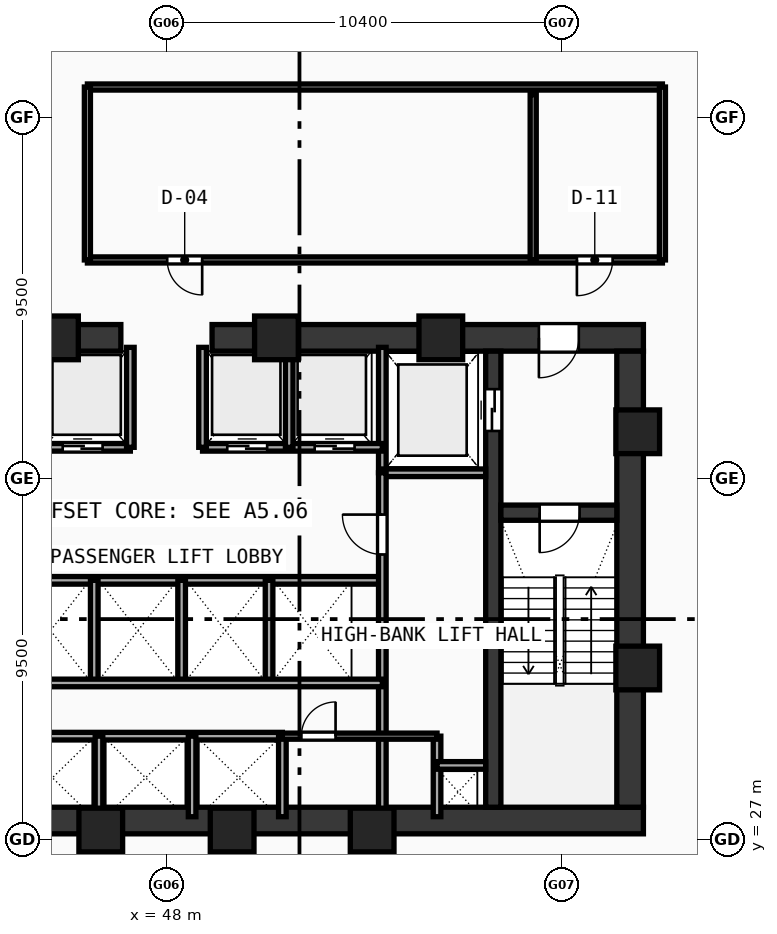
"""IFC4 building model, lengths in metres.
Left out: names, types, materials, properties, quantities, classifications, styles, units other than length and angle.
Written with IfcOpenShell. Run it as: python <this file> out.ifc"""

import sys

from ifc_helpers import new_model, si_unit, direction, frame, frame_2d, origin, origin_with_axes, origin_2d, place, context, subcontext, project, spatial, rectangle, hollow_rectangle, extrude, source, transform, mapped, element, fill, save


model = new_model("IFC4")
c1 = context("Model", 3, precision=1e-05, world=origin(), true_north=direction((0.0, 1.0)))
c2 = subcontext(c1, "Body", "Model", "MODEL_VIEW")
j1 = project(units=[si_unit("LENGTHUNIT", "METRE"), si_unit("PLANEANGLEUNIT", "RADIAN")], contexts=[c1])
p1 = place(None, origin())
s1 = spatial("IfcSite", under=j1, at=p1, CompositionType="ELEMENT")
p2 = place(p1, origin())
s2 = spatial("IfcBuilding", under=s1, at=p2, CompositionType="ELEMENT")
p3 = place(p2, frame((0.0, 0.0, 59.44)))
s3 = spatial("IfcBuildingStorey", under=s2, at=p3, CompositionType="ELEMENT", Elevation=59.44)
p4 = place(p3, frame((35.45, 27.5, 0.0), z_axis=(0.0, 0.0, 1.0), x_axis=(1.0, 0.0, 0.0)))
e1 = element("IfcWall", 1, at=p4, inside=s3, PredefinedType="SHEAR", context=c2, shape_type="SweptSolid", body=[
    extrude(rectangle(XDim=25.1, YDim=0.7, at=frame_2d((12.55, 0.0))), origin(), (0.0, 0.0, 1.0), 3.37),
])
p5 = place(p3, frame((35.45, 40.2, 0.0), z_axis=(0.0, 0.0, 1.0), x_axis=(1.0, 0.0, 0.0)))
e2 = element("IfcWall", 2, at=p5, inside=s3, PredefinedType="SHEAR", context=c2, shape_type="SweptSolid", body=[
    extrude(rectangle(XDim=11.35, YDim=0.7, at=frame_2d((5.675, 0.0))), origin(), (0.0, 0.0, 1.0), 3.37),
])
p6 = place(p5, frame((1.7, 0.0, 0.0)))
e3 = element("IfcOpeningElement", 3, at=p6, cuts=e2, PredefinedType="OPENING", context=c2, shape_type="SweptSolid", body=[
    extrude(rectangle(XDim=1.05, YDim=2.1, at=frame_2d((0.525, 1.05))), frame((0.0, 0.36, 0.0), z_axis=(0.0, -1.0, 0.0), x_axis=(1.0, 0.0, 0.0)), (0.0, 0.0, 1.0), 0.72),
])
p7 = place(p3, frame((49.2, 40.2, 0.0), z_axis=(0.0, 0.0, 1.0), x_axis=(1.0, 0.0, 0.0)))
e4 = element("IfcWall", 4, at=p7, inside=s3, PredefinedType="SHEAR", context=c2, shape_type="SweptSolid", body=[
    extrude(rectangle(XDim=11.35, YDim=0.7, at=frame_2d((5.675, 0.0))), origin(), (0.0, 0.0, 1.0), 3.37),
])
p8 = place(p7, frame((8.6, 0.0, 0.0)))
e5 = element("IfcOpeningElement", 5, at=p8, cuts=e4, PredefinedType="OPENING", context=c2, shape_type="SweptSolid", body=[
    extrude(rectangle(XDim=1.05, YDim=2.1, at=frame_2d((0.525, 1.05))), frame((0.0, 0.36, 0.0), z_axis=(0.0, -1.0, 0.0), x_axis=(1.0, 0.0, 0.0)), (0.0, 0.0, 1.0), 0.72),
])
p9 = place(p3, frame((60.2, 27.85, 0.0), z_axis=(0.0, 0.0, 1.0), x_axis=(0.0, 1.0, 0.0)))
e6 = element("IfcWall", 6, at=p9, inside=s3, PredefinedType="SHEAR", context=c2, shape_type="SweptSolid", body=[
    extrude(rectangle(XDim=12.0, YDim=0.7, at=frame_2d((6.0, 0.0))), origin(), (0.0, 0.0, 1.0), 3.37),
])
p10 = place(p3, frame((56.6, 27.85, 0.0), z_axis=(0.0, 0.0, 1.0), x_axis=(0.0, 1.0, 0.0)))
e7 = element("IfcWall", 7, at=p10, inside=s3, PredefinedType="SHEAR", context=c2, shape_type="SweptSolid", body=[
    extrude(rectangle(XDim=12.0, YDim=0.4, at=frame_2d((6.0, 0.0))), origin(), (0.0, 0.0, 1.0), 3.37),
])
p11 = place(p10, frame((9.9, 0.0, 0.0)))
e8 = element("IfcOpeningElement", 8, at=p11, cuts=e7, PredefinedType="OPENING", context=c2, shape_type="SweptSolid", body=[
    extrude(rectangle(XDim=1.1, YDim=2.1, at=frame_2d((0.55, 1.05))), frame((0.0, 0.21, 0.0), z_axis=(0.0, -1.0, 0.0), x_axis=(1.0, 0.0, 0.0)), (0.0, 0.0, 1.0), 0.42),
])
p12 = place(p3, frame((56.8, 35.6, 0.0), z_axis=(0.0, 0.0, 1.0), x_axis=(1.0, 0.0, 0.0)))
e9 = element("IfcWall", 9, at=p12, inside=s3, PredefinedType="SHEAR", context=c2, shape_type="SweptSolid", body=[
    extrude(rectangle(XDim=3.05, YDim=0.4, at=frame_2d((1.525, 0.0))), origin(), (0.0, 0.0, 1.0), 3.37),
])
p13 = place(p12, frame((1.02, 0.0, 0.0)))
e10 = element("IfcOpeningElement", 10, at=p13, cuts=e9, PredefinedType="OPENING", context=c2, shape_type="SweptSolid", body=[
    extrude(rectangle(XDim=1.05, YDim=2.1, at=frame_2d((0.525, 1.05))), frame((0.0, 0.21, 0.0), z_axis=(0.0, -1.0, 0.0), x_axis=(1.0, 0.0, 0.0)), (0.0, 0.0, 1.0), 0.42),
])
m1 = source(origin(), c2, "Body", "SweptSolid", [
    extrude(hollow_rectangle(XDim=1.15, YDim=1.15, WallThickness=0.048, at=origin_2d()), origin(), (0.0, 0.0, 1.0), 3.63),
])
for number, where, z_axis, x_axis in (
    (11, (46.272, 27.25, -0.26), (0.0, 0.0, 1.0), (1.0, 0.0, 0.0)),
    (12, (49.729, 27.25, -0.26), (0.0, 0.0, 1.0), (1.0, 0.0, 0.0)),
    (13, (53.412, 27.25, -0.26), (0.0, 0.0, 1.0), (1.0, 0.0, 0.0)),
    (14, (60.4, 31.513, -0.26), (0.0, 0.0, 1.0), (1.0, 0.0, 0.0)),
    (15, (60.4, 37.729, -0.26), (0.0, 0.0, 1.0), (1.0, 0.0, 0.0)),
    (16, (55.219, 40.2, -0.26), (0.0, 0.0, 1.0), (1.0, 0.0, 0.0)),
    (17, (50.894, 40.2, -0.26), (0.0, 0.0, 1.0), (1.0, 0.0, 0.0)),
    (18, (45.106, 40.2, -0.26), (0.0, 0.0, 1.0), (1.0, 0.0, 0.0)),
):
    element("IfcColumn", number, at=place(p3, frame(where, z_axis=z_axis, x_axis=x_axis)), inside=s3, PredefinedType="COLUMN", context=c2, shape_type="MappedRepresentation", body=[
        mapped(m1, transform((0.0, 0.0, 0.0), scale=1.0)),
    ])
p14 = place(p3, frame((53.68, 36.65, 0.0), z_axis=(0.0, 0.0, 1.0), x_axis=(0.0, 1.0, 0.0)))
e19 = element("IfcWall", 19, at=p14, inside=s3, PredefinedType="SOLIDWALL", context=c2, shape_type="SweptSolid", body=[
    extrude(rectangle(XDim=3.3, YDim=0.2, at=frame_2d((1.65, 0.0))), origin(), (0.0, 0.0, 1.0), 3.37),
])
p15 = place(p3, frame((53.68, 36.65, 0.0), z_axis=(0.0, 0.0, 1.0), x_axis=(1.0, 0.0, 0.0)))
e20 = element("IfcWall", 20, at=p15, inside=s3, PredefinedType="SOLIDWALL", context=c2, shape_type="SweptSolid", body=[
    extrude(rectangle(XDim=2.72, YDim=0.2, at=frame_2d((1.36, 0.0))), origin(), (0.0, 0.0, 1.0), 3.37),
])
p16 = place(p3, frame((42.32, 37.32, 0.0), z_axis=(0.0, 0.0, 1.0), x_axis=(1.0, 0.0, 0.0)))
e21 = element("IfcWall", 21, at=p16, inside=s3, PredefinedType="SOLIDWALL", context=c2, shape_type="SweptSolid", body=[
    extrude(rectangle(XDim=4.73, YDim=0.2, at=frame_2d((2.365, 0.0))), origin(), (0.0, 0.0, 1.0), 3.37),
])
p17 = place(p16, frame((0.65, 0.0, 0.0)))
e22 = element("IfcOpeningElement", 22, at=p17, cuts=e21, PredefinedType="OPENING", context=c2, shape_type="SweptSolid", body=[
    extrude(rectangle(XDim=1.05, YDim=2.1, at=frame_2d((0.525, 1.05))), frame((0.0, 0.11, 0.0), z_axis=(0.0, -1.0, 0.0), x_axis=(1.0, 0.0, 0.0)), (0.0, 0.0, 1.0), 0.22),
])
p18 = place(p16, frame((2.95, 0.0, 0.0)))
e23 = element("IfcOpeningElement", 23, at=p18, cuts=e21, PredefinedType="OPENING", context=c2, shape_type="SweptSolid", body=[
    extrude(rectangle(XDim=1.05, YDim=2.1, at=frame_2d((0.525, 1.05))), frame((0.0, 0.11, 0.0), z_axis=(0.0, -1.0, 0.0), x_axis=(1.0, 0.0, 0.0)), (0.0, 0.0, 1.0), 0.22),
])
p19 = place(p3, frame((48.95, 37.32, 0.0), z_axis=(0.0, 0.0, 1.0), x_axis=(1.0, 0.0, 0.0)))
e24 = element("IfcWall", 24, at=p19, inside=s3, PredefinedType="SOLIDWALL", context=c2, shape_type="SweptSolid", body=[
    extrude(rectangle(XDim=4.73, YDim=0.2, at=frame_2d((2.365, 0.0))), origin(), (0.0, 0.0, 1.0), 3.37),
])
p20 = place(p19, frame((0.65, 0.0, 0.0)))
e25 = element("IfcOpeningElement", 25, at=p20, cuts=e24, PredefinedType="OPENING", context=c2, shape_type="SweptSolid", body=[
    extrude(rectangle(XDim=1.05, YDim=2.1, at=frame_2d((0.525, 1.05))), frame((0.0, 0.11, 0.0), z_axis=(0.0, -1.0, 0.0), x_axis=(1.0, 0.0, 0.0)), (0.0, 0.0, 1.0), 0.22),
])
p21 = place(p19, frame((2.95, 0.0, 0.0)))
e26 = element("IfcOpeningElement", 26, at=p21, cuts=e24, PredefinedType="OPENING", context=c2, shape_type="SweptSolid", body=[
    extrude(rectangle(XDim=1.05, YDim=2.1, at=frame_2d((0.525, 1.05))), frame((0.0, 0.11, 0.0), z_axis=(0.0, -1.0, 0.0), x_axis=(1.0, 0.0, 0.0)), (0.0, 0.0, 1.0), 0.22),
])
for number, where, z_axis, x_axis in (
    (27, (47.05, 37.32, 0.0), (0.0, 0.0, 1.0), (0.0, 1.0, 0.0)),
    (28, (48.95, 37.32, 0.0), (0.0, 0.0, 1.0), (0.0, 1.0, 0.0)),
    (29, (51.23, 37.32, 0.0), (0.0, 0.0, 1.0), (0.0, 1.0, 0.0)),
):
    element("IfcWall", number, at=place(p3, frame(where, z_axis=z_axis, x_axis=x_axis)), inside=s3, PredefinedType="SOLIDWALL", context=c2, shape_type="SweptSolid", body=[
        extrude(rectangle(XDim=2.63, YDim=0.2, at=frame_2d((1.315, 0.0))), origin(), (0.0, 0.0, 1.0), 3.37),
    ])
p22 = place(p3, frame((43.85, 33.82, 0.0), z_axis=(0.0, 0.0, 1.0), x_axis=(1.0, 0.0, 0.0)))
e30 = element("IfcWall", 30, at=p22, inside=s3, PredefinedType="SOLIDWALL", context=c2, shape_type="SweptSolid", body=[
    extrude(rectangle(XDim=9.83, YDim=0.2, at=frame_2d((4.915, 0.0))), origin(), (0.0, 0.0, 1.0), 3.37),
])
p23 = place(p3, frame((53.68, 27.6, 0.0), z_axis=(0.0, 0.0, 1.0), x_axis=(0.0, 1.0, 0.0)))
e31 = element("IfcWall", 31, at=p23, inside=s3, PredefinedType="SOLIDWALL", context=c2, shape_type="SweptSolid", body=[
    extrude(rectangle(XDim=9.05, YDim=0.2, at=frame_2d((4.525, 0.0))), origin(), (0.0, 0.0, 1.0), 3.37),
])
p24 = place(p23, frame((6.9, 0.0, 0.0)))
e32 = element("IfcOpeningElement", 32, at=p24, cuts=e31, PredefinedType="OPENING", context=c2, shape_type="SweptSolid", body=[
    extrude(rectangle(XDim=1.05, YDim=2.1, at=frame_2d((0.525, 1.05))), frame((0.0, 0.11, 0.0), z_axis=(0.0, -1.0, 0.0), x_axis=(1.0, 0.0, 0.0)), (0.0, 0.0, 1.0), 0.22),
])
for number, where, z_axis, x_axis in (
    (33, (46.1, 31.12, 0.0), (0.0, 0.0, 1.0), (0.0, 1.0, 0.0)),
    (34, (48.4, 31.12, 0.0), (0.0, 0.0, 1.0), (0.0, 1.0, 0.0)),
    (35, (50.7, 31.12, 0.0), (0.0, 0.0, 1.0), (0.0, 1.0, 0.0)),
):
    element("IfcWall", number, at=place(p3, frame(where, z_axis=z_axis, x_axis=x_axis)), inside=s3, PredefinedType="SOLIDWALL", context=c2, shape_type="SweptSolid", body=[
        extrude(rectangle(XDim=2.7, YDim=0.2, at=frame_2d((1.35, 0.0))), origin(), (0.0, 0.0, 1.0), 3.37),
    ])
p25 = place(p3, frame((43.85, 29.72, 0.0), z_axis=(0.0, 0.0, 1.0), x_axis=(1.0, 0.0, 0.0)))
e36 = element("IfcWall", 36, at=p25, inside=s3, PredefinedType="SOLIDWALL", context=c2, shape_type="SweptSolid", body=[
    extrude(rectangle(XDim=7.2, YDim=0.2, at=frame_2d((3.6, 0.0))), origin(), (0.0, 0.0, 1.0), 3.37),
])
p26 = place(p3, frame((51.05, 27.6, 0.0), z_axis=(0.0, 0.0, 1.0), x_axis=(0.0, 1.0, 0.0)))
e37 = element("IfcWall", 37, at=p26, inside=s3, PredefinedType="SOLIDWALL", context=c2, shape_type="SweptSolid", body=[
    extrude(rectangle(XDim=2.12, YDim=0.2, at=frame_2d((1.06, 0.0))), origin(), (0.0, 0.0, 1.0), 3.37),
])
p27 = place(p3, frame((43.85, 31.12, 0.0), z_axis=(0.0, 0.0, 1.0), x_axis=(1.0, 0.0, 0.0)))
e38 = element("IfcWall", 38, at=p27, inside=s3, PredefinedType="SOLIDWALL", context=c2, shape_type="SweptSolid", body=[
    extrude(rectangle(XDim=9.83, YDim=0.2, at=frame_2d((4.915, 0.0))), origin(), (0.0, 0.0, 1.0), 3.37),
])
for number, where, z_axis, x_axis in (
    (39, (46.225, 27.6, 0.0), (0.0, 0.0, 1.0), (0.0, 1.0, 0.0)),
    (40, (48.675, 27.6, 0.0), (0.0, 0.0, 1.0), (0.0, 1.0, 0.0)),
    (41, (55.12, 27.6, 0.0), (0.0, 0.0, 1.0), (0.0, 1.0, 0.0)),
):
    element("IfcWall", number, at=place(p3, frame(where, z_axis=z_axis, x_axis=x_axis)), inside=s3, PredefinedType="SOLIDWALL", context=c2, shape_type="SweptSolid", body=[
        extrude(rectangle(XDim=2.12, YDim=0.2, at=frame_2d((1.06, 0.0))), origin(), (0.0, 0.0, 1.0), 3.37),
    ])
p28 = place(p3, frame((55.12, 28.95, 0.0), z_axis=(0.0, 0.0, 1.0), x_axis=(1.0, 0.0, 0.0)))
e42 = element("IfcWall", 42, at=p28, inside=s3, PredefinedType="SOLIDWALL", context=c2, shape_type="SweptSolid", body=[
    extrude(rectangle(XDim=1.28, YDim=0.2, at=frame_2d((0.64, 0.0))), origin(), (0.0, 0.0, 1.0), 3.37),
])
p29 = place(p3, frame((51.05, 29.72, 0.0), z_axis=(0.0, 0.0, 1.0), x_axis=(1.0, 0.0, 0.0)))
e43 = element("IfcWall", 43, at=p29, inside=s3, PredefinedType="PARTITIONING", context=c2, shape_type="SweptSolid", body=[
    extrude(rectangle(XDim=4.07, YDim=0.16, at=frame_2d((2.035, 0.0))), origin(), (0.0, 0.0, 1.0), 3.37),
])
p30 = place(p29, frame((0.5, 0.0, 0.0)))
e44 = element("IfcOpeningElement", 44, at=p30, cuts=e43, PredefinedType="OPENING", context=c2, shape_type="SweptSolid", body=[
    extrude(rectangle(XDim=0.9, YDim=2.1, at=frame_2d((0.45, 1.05))), frame((0.0, 0.09, 0.0), z_axis=(0.0, -1.0, 0.0), x_axis=(1.0, 0.0, 0.0)), (0.0, 0.0, 1.0), 0.18),
])
p31 = place(p3, frame((45.92, 42.25, 0.0), z_axis=(0.0, 0.0, 1.0), x_axis=(1.0, 0.0, 0.0)))
e45 = element("IfcWall", 45, at=p31, inside=s3, PredefinedType="PARTITIONING", context=c2, shape_type="SweptSolid", body=[
    extrude(rectangle(XDim=15.13, YDim=0.16, at=frame_2d((7.565, 0.0))), origin(), (0.0, 0.0, 1.0), 2.67),
])
p32 = place(p31, frame((2.1, 0.0, 0.0)))
e46 = element("IfcOpeningElement", 46, at=p32, cuts=e45, PredefinedType="OPENING", context=c2, shape_type="SweptSolid", body=[
    extrude(rectangle(XDim=0.92, YDim=2.1, at=frame_2d((0.46, 1.05))), frame((0.0, 0.09, 0.0), z_axis=(0.0, -1.0, 0.0), x_axis=(1.0, 0.0, 0.0)), (0.0, 0.0, 1.0), 0.18),
])
p33 = place(p31, frame((12.88, 0.0, 0.0)))
e47 = element("IfcOpeningElement", 47, at=p33, cuts=e45, PredefinedType="OPENING", context=c2, shape_type="SweptSolid", body=[
    extrude(rectangle(XDim=0.94, YDim=2.1, at=frame_2d((0.47, 1.05))), frame((0.0, 0.09, 0.0), z_axis=(0.0, -1.0, 0.0), x_axis=(1.0, 0.0, 0.0)), (0.0, 0.0, 1.0), 0.18),
])
p34 = place(p3, frame((45.92, 46.8, 0.0), z_axis=(0.0, 0.0, 1.0), x_axis=(1.0, 0.0, 0.0)))
e48 = element("IfcWall", 48, at=p34, inside=s3, PredefinedType="PARTITIONING", context=c2, shape_type="SweptSolid", body=[
    extrude(rectangle(XDim=15.13, YDim=0.16, at=frame_2d((7.565, 0.0))), origin(), (0.0, 0.0, 1.0), 2.67),
])
p35 = place(p3, frame((45.92, 42.25, 0.0), z_axis=(0.0, 0.0, 1.0), x_axis=(0.0, 1.0, 0.0)))
e49 = element("IfcWall", 49, at=p35, inside=s3, PredefinedType="PARTITIONING", context=c2, shape_type="SweptSolid", body=[
    extrude(rectangle(XDim=4.55, YDim=0.16, at=frame_2d((2.275, 0.0))), origin(), (0.0, 0.0, 1.0), 3.37),
])
p36 = place(p3, frame((61.05, 42.25, 0.0), z_axis=(0.0, 0.0, 1.0), x_axis=(0.0, 1.0, 0.0)))
e50 = element("IfcWall", 50, at=p36, inside=s3, PredefinedType="PARTITIONING", context=c2, shape_type="SweptSolid", body=[
    extrude(rectangle(XDim=4.55, YDim=0.16, at=frame_2d((2.275, 0.0))), origin(), (0.0, 0.0, 1.0), 2.67),
])
p37 = place(p3, frame((57.65, 42.25, 0.0), z_axis=(0.0, 0.0, 1.0), x_axis=(0.0, 1.0, 0.0)))
e51 = element("IfcWall", 51, at=p37, inside=s3, PredefinedType="PARTITIONING", context=c2, shape_type="SweptSolid", body=[
    extrude(rectangle(XDim=4.35, YDim=0.16, at=frame_2d((2.175, 0.0))), origin(), (0.0, 0.0, 1.0), 2.67),
])
m2 = source(origin(), c2, "Body", "SweptSolid", [
    extrude(rectangle(XDim=1.05, YDim=2.1, at=frame_2d((0.525, 1.05))), frame((0.0, 0.025, 0.0), z_axis=(0.0, -1.0, 0.0), x_axis=(1.0, 0.0, 0.0)), (0.0, 0.0, 1.0), 0.05),
])
p38 = place(p13, frame((1.05, 0.0, 0.0), z_axis=(0.0, 0.0, 1.0), x_axis=(-1.0, 0.0, 0.0)))
e52 = element("IfcDoor", 52, at=p38, inside=s3, OperationType="SINGLE_SWING_RIGHT", PredefinedType="DOOR", context=c2, shape_type="MappedRepresentation", body=[
    mapped(m2, transform((0.0, 0.0, 0.0), scale=1.0)),
])
fill(e10, e52)
p39 = place(p8, frame((1.05, 0.0, 0.0), z_axis=(0.0, 0.0, 1.0), x_axis=(-1.0, 0.0, 0.0)))
e53 = element("IfcDoor", 53, at=p39, inside=s3, OperationType="SINGLE_SWING_RIGHT", PredefinedType="DOOR", context=c2, shape_type="MappedRepresentation", body=[
    mapped(m2, transform((0.0, 0.0, 0.0), scale=1.0)),
])
fill(e5, e53)
m3 = source(origin(), c2, "Body", "SweptSolid", [
    extrude(rectangle(XDim=1.1, YDim=2.1, at=frame_2d((0.55, 1.05))), frame((0.0, 0.025, 0.0), z_axis=(0.0, -1.0, 0.0), x_axis=(1.0, 0.0, 0.0)), (0.0, 0.0, 1.0), 0.05),
])
p40 = place(p11, origin_with_axes())
e54 = element("IfcDoor", 54, at=p40, inside=s3, OperationType="DOUBLE_DOOR_SLIDING", PredefinedType="DOOR", context=c2, shape_type="MappedRepresentation", body=[
    mapped(m3, transform((0.0, 0.0, 0.0), scale=1.0)),
])
fill(e8, e54)
p41 = place(p18, frame((1.05, 0.0, 0.0), z_axis=(0.0, 0.0, 1.0), x_axis=(-1.0, 0.0, 0.0)))
e55 = element("IfcDoor", 55, at=p41, inside=s3, OperationType="DOUBLE_DOOR_SLIDING", PredefinedType="DOOR", context=c2, shape_type="MappedRepresentation", body=[
    mapped(m2, transform((0.0, 0.0, 0.0), scale=1.0)),
])
fill(e23, e55)
p42 = place(p20, frame((1.05, 0.0, 0.0), z_axis=(0.0, 0.0, 1.0), x_axis=(-1.0, 0.0, 0.0)))
e56 = element("IfcDoor", 56, at=p42, inside=s3, OperationType="DOUBLE_DOOR_SLIDING", PredefinedType="DOOR", context=c2, shape_type="MappedRepresentation", body=[
    mapped(m2, transform((0.0, 0.0, 0.0), scale=1.0)),
])
fill(e25, e56)
p43 = place(p21, frame((1.05, 0.0, 0.0), z_axis=(0.0, 0.0, 1.0), x_axis=(-1.0, 0.0, 0.0)))
e57 = element("IfcDoor", 57, at=p43, inside=s3, OperationType="DOUBLE_DOOR_SLIDING", PredefinedType="DOOR", context=c2, shape_type="MappedRepresentation", body=[
    mapped(m2, transform((0.0, 0.0, 0.0), scale=1.0)),
])
fill(e26, e57)
p44 = place(p24, origin_with_axes())
e58 = element("IfcDoor", 58, at=p44, inside=s3, OperationType="SINGLE_SWING_RIGHT", PredefinedType="DOOR", context=c2, shape_type="MappedRepresentation", body=[
    mapped(m2, transform((0.0, 0.0, 0.0), scale=1.0)),
])
fill(e32, e58)
m4 = source(origin(), c2, "Body", "SweptSolid", [
    extrude(rectangle(XDim=0.9, YDim=2.1, at=frame_2d((0.45, 1.05))), frame((0.0, 0.025, 0.0), z_axis=(0.0, -1.0, 0.0), x_axis=(1.0, 0.0, 0.0)), (0.0, 0.0, 1.0), 0.05),
])
p45 = place(p30, origin_with_axes())
e59 = element("IfcDoor", 59, at=p45, inside=s3, OperationType="SINGLE_SWING_RIGHT", PredefinedType="DOOR", context=c2, shape_type="MappedRepresentation", body=[
    mapped(m4, transform((0.0, 0.0, 0.0), scale=1.0)),
])
fill(e44, e59)
m5 = source(origin(), c2, "Body", "SweptSolid", [
    extrude(rectangle(XDim=0.92, YDim=2.1, at=frame_2d((0.46, 1.05))), frame((0.0, 0.025, 0.0), z_axis=(0.0, -1.0, 0.0), x_axis=(1.0, 0.0, 0.0)), (0.0, 0.0, 1.0), 0.05),
])
p46 = place(p32, frame((0.92, 0.0, 0.0), z_axis=(0.0, 0.0, 1.0), x_axis=(-1.0, 0.0, 0.0)))
e60 = element("IfcDoor", 60, at=p46, inside=s3, OperationType="SINGLE_SWING_LEFT", PredefinedType="DOOR", context=c2, shape_type="MappedRepresentation", body=[
    mapped(m5, transform((0.0, 0.0, 0.0), scale=1.0)),
])
fill(e46, e60)
m6 = source(origin(), c2, "Body", "SweptSolid", [
    extrude(rectangle(XDim=0.94, YDim=2.1, at=frame_2d((0.47, 1.05))), frame((0.0, 0.025, 0.0), z_axis=(0.0, -1.0, 0.0), x_axis=(1.0, 0.0, 0.0)), (0.0, 0.0, 1.0), 0.05),
])
p47 = place(p33, frame((0.94, 0.0, 0.0), z_axis=(0.0, 0.0, 1.0), x_axis=(-1.0, 0.0, 0.0)))
e61 = element("IfcDoor", 61, at=p47, inside=s3, OperationType="SINGLE_SWING_RIGHT", PredefinedType="DOOR", context=c2, shape_type="MappedRepresentation", body=[
    mapped(m6, transform((0.0, 0.0, 0.0), scale=1.0)),
])
fill(e47, e61)
save(model, sys.argv[1])
